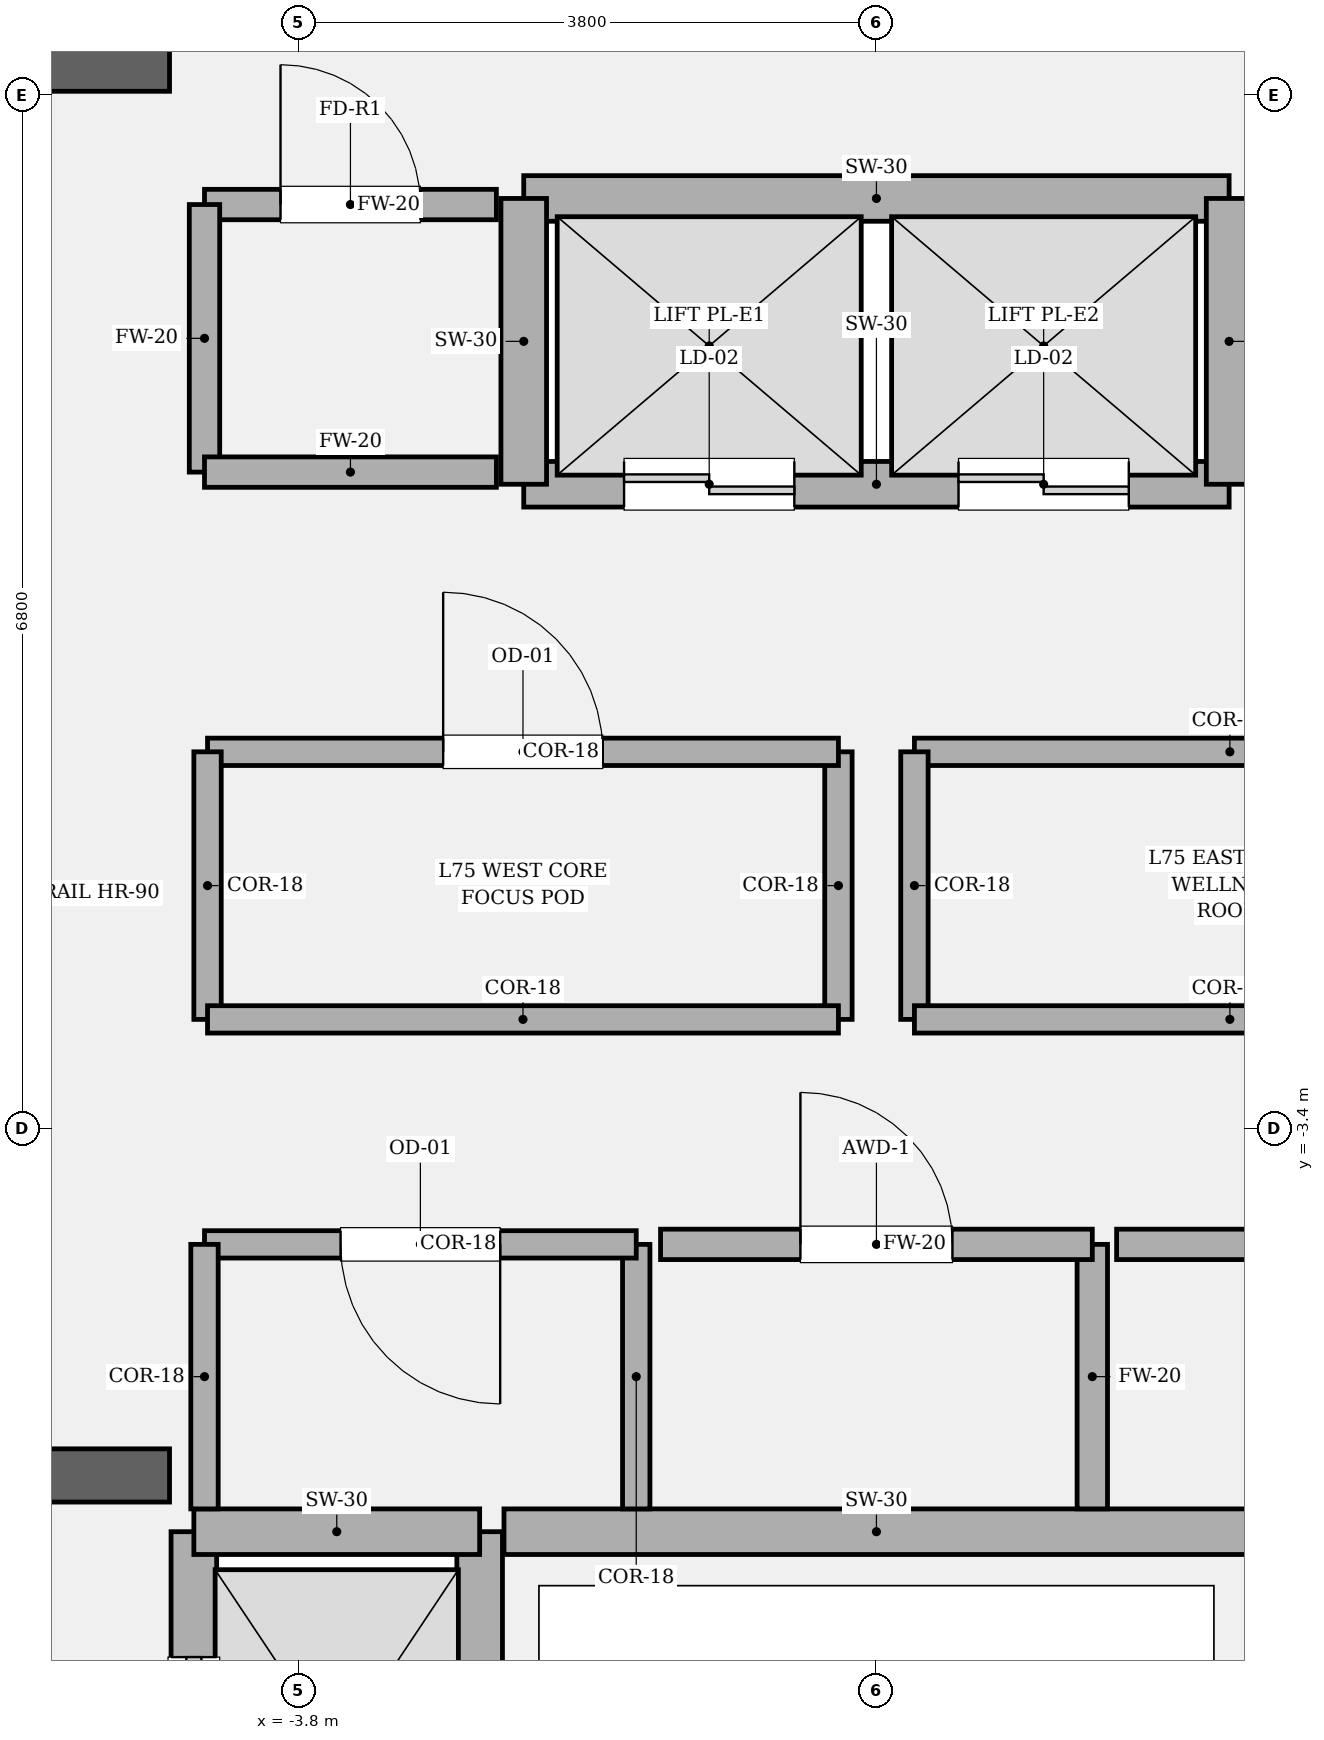
"""IFC4 building model, lengths in metres.
Left out: names, types, materials, properties, quantities, classifications, styles, units other than length and angle.
Written with IfcOpenShell. Run it as: python <this file> out.ifc"""

import sys

from ifc_helpers import new_model, si_unit, direction, frame, frame_2d, origin, place, context, subcontext, project, spatial, rectangle, extrude, element, fill, save


model = new_model("IFC4")
c1 = context("Model", 3, precision=1e-05, world=origin(), true_north=direction((0.0, 1.0)))
c2 = subcontext(c1, "Body", "Model", "MODEL_VIEW")
j1 = project(units=[si_unit("LENGTHUNIT", "METRE"), si_unit("PLANEANGLEUNIT", "RADIAN")], contexts=[c1])
p1 = place(None, origin())
s1 = spatial("IfcSite", under=j1, at=p1, CompositionType="ELEMENT")
p2 = place(p1, origin())
s2 = spatial("IfcBuilding", under=s1, at=p2, CompositionType="ELEMENT")
p3 = place(p2, frame((0.0, 0.0, 317.4)))
s3 = spatial("IfcBuildingStorey", under=s2, at=p3, CompositionType="ELEMENT", Elevation=317.4)
p4 = place(p3, frame((-9.975, -5.68, 0.0), z_axis=(0.0, 0.0, 1.0), x_axis=(1.0, 0.0, 0.0)))
e1 = element("IfcWall", 1, at=p4, inside=s3, PredefinedType="SOLIDWALL", context=c2, shape_type="SweptSolid", body=[
    extrude(rectangle(XDim=5.325, YDim=0.35, at=frame_2d((2.663, 0.0))), origin(), (0.0, 0.0, 1.0), 4.2),
])
p5 = place(p4, frame((1.435, 0.0, 0.0)))
e2 = element("IfcOpeningElement", 2, at=p5, cuts=e1, PredefinedType="OPENING", context=c2, shape_type="SweptSolid", body=[
    extrude(rectangle(XDim=1.18, YDim=2.2, at=frame_2d((0.59, 1.1))), frame((0.0, 0.185, 0.0), z_axis=(0.0, -1.0, 0.0), x_axis=(1.0, 0.0, 0.0)), (0.0, 0.0, 1.0), 0.37),
])
p6 = place(p3, frame((-9.975, 3.6, 0.0), z_axis=(0.0, 0.0, 1.0), x_axis=(1.0, 0.0, 0.0)))
e3 = element("IfcWall", 3, at=p6, inside=s3, PredefinedType="SOLIDWALL", context=c2, shape_type="SweptSolid", body=[
    extrude(rectangle(XDim=5.325, YDim=0.35, at=frame_2d((2.663, 0.0))), origin(), (0.0, 0.0, 1.0), 4.2),
])
p7 = place(p3, frame((-4.49, -8.82, 0.0), z_axis=(0.0, 0.0, 1.0), x_axis=(0.0, 1.0, 0.0)))
e4 = element("IfcWall", 4, at=p7, inside=s3, PredefinedType="SOLIDWALL", context=c2, shape_type="SweptSolid", body=[
    extrude(rectangle(XDim=2.77, YDim=0.3, at=frame_2d((1.385, 0.0))), origin(), (0.0, 0.0, 1.0), 4.0),
])
p8 = place(p7, frame((0.825, 0.0, 0.0)))
e5 = element("IfcOpeningElement", 5, at=p8, cuts=e4, PredefinedType="OPENING", context=c2, shape_type="SweptSolid", body=[
    extrude(rectangle(XDim=1.12, YDim=2.25, at=frame_2d((0.56, 1.125))), frame((0.0, 0.16, 0.0), z_axis=(0.0, -1.0, 0.0), x_axis=(1.0, 0.0, 0.0)), (0.0, 0.0, 1.0), 0.32),
])
p9 = place(p3, frame((-2.61, -8.82, 0.0), z_axis=(0.0, 0.0, 1.0), x_axis=(0.0, 1.0, 0.0)))
e6 = element("IfcWall", 6, at=p9, inside=s3, PredefinedType="SOLIDWALL", context=c2, shape_type="SweptSolid", body=[
    extrude(rectangle(XDim=2.77, YDim=0.3, at=frame_2d((1.385, 0.0))), origin(), (0.0, 0.0, 1.0), 4.0),
])
p10 = place(p3, frame((-4.49, -6.05, 0.0), z_axis=(0.0, 0.0, 1.0), x_axis=(1.0, 0.0, 0.0)))
e7 = element("IfcWall", 7, at=p10, inside=s3, PredefinedType="SOLIDWALL", context=c2, shape_type="SweptSolid", body=[
    extrude(rectangle(XDim=1.88, YDim=0.3, at=frame_2d((0.94, 0.0))), origin(), (0.0, 0.0, 1.0), 4.0),
])
p11 = place(p3, frame((-2.32, 0.84, 0.0), z_axis=(0.0, 0.0, 1.0), x_axis=(1.0, 0.0, 0.0)))
e8 = element("IfcWall", 8, at=p11, inside=s3, PredefinedType="SOLIDWALL", context=c2, shape_type="SweptSolid", body=[
    extrude(rectangle(XDim=4.64, YDim=0.3, at=frame_2d((2.32, 0.0))), origin(), (0.0, 0.0, 1.0), 4.0),
])
p12 = place(p11, frame((0.66, 0.0, 0.0)))
e9 = element("IfcOpeningElement", 9, at=p12, cuts=e8, PredefinedType="OPENING", context=c2, shape_type="SweptSolid", body=[
    extrude(rectangle(XDim=1.12, YDim=2.25, at=frame_2d((0.56, 1.125))), frame((0.0, 0.16, 0.0), z_axis=(0.0, -1.0, 0.0), x_axis=(1.0, 0.0, 0.0)), (0.0, 0.0, 1.0), 0.32),
])
p13 = place(p11, frame((2.86, 0.0, 0.0)))
e10 = element("IfcOpeningElement", 10, at=p13, cuts=e8, PredefinedType="OPENING", context=c2, shape_type="SweptSolid", body=[
    extrude(rectangle(XDim=1.12, YDim=2.25, at=frame_2d((0.56, 1.125))), frame((0.0, 0.16, 0.0), z_axis=(0.0, -1.0, 0.0), x_axis=(1.0, 0.0, 0.0)), (0.0, 0.0, 1.0), 0.32),
])
p14 = place(p3, frame((-2.32, 2.72, 0.0), z_axis=(0.0, 0.0, 1.0), x_axis=(1.0, 0.0, 0.0)))
e11 = element("IfcWall", 11, at=p14, inside=s3, PredefinedType="SOLIDWALL", context=c2, shape_type="SweptSolid", body=[
    extrude(rectangle(XDim=4.64, YDim=0.3, at=frame_2d((2.32, 0.0))), origin(), (0.0, 0.0, 1.0), 4.0),
])
for number, where, z_axis, x_axis in (
    (12, (-2.32, 0.84, 0.0), (0.0, 0.0, 1.0), (0.0, 1.0, 0.0)),
    (13, (2.32, 0.84, 0.0), (0.0, 0.0, 1.0), (0.0, 1.0, 0.0)),
):
    element("IfcWall", number, at=place(p3, frame(where, z_axis=z_axis, x_axis=x_axis)), inside=s3, PredefinedType="SOLIDWALL", context=c2, shape_type="SweptSolid", body=[
        extrude(rectangle(XDim=1.88, YDim=0.3, at=frame_2d((0.94, 0.0))), origin(), (0.0, 0.0, 1.0), 4.0),
    ])
p15 = place(p3, frame((-2.45, -6.05, 0.0), z_axis=(0.0, 0.0, 1.0), x_axis=(1.0, 0.0, 0.0)))
e14 = element("IfcWall", 14, at=p15, inside=s3, PredefinedType="SOLIDWALL", context=c2, shape_type="SweptSolid", body=[
    extrude(rectangle(XDim=4.9, YDim=0.3, at=frame_2d((2.45, 0.0))), origin(), (0.0, 0.0, 1.0), 4.0),
])
p16 = place(p3, frame((-1.58, -5.9, 0.0), z_axis=(0.0, 0.0, 1.0), x_axis=(0.0, 1.0, 0.0)))
e15 = element("IfcWall", 15, at=p16, inside=s3, PredefinedType="PARTITIONING", context=c2, shape_type="SweptSolid", body=[
    extrude(rectangle(XDim=1.74, YDim=0.18, at=frame_2d((0.87, 0.0))), origin(), (0.0, 0.0, 1.0), 4.0),
])
p17 = place(p3, frame((-1.58, -4.16, 0.0), z_axis=(0.0, 0.0, 1.0), x_axis=(-1.0, 0.0, 0.0)))
e16 = element("IfcWall", 16, at=p17, inside=s3, PredefinedType="PARTITIONING", context=c2, shape_type="SweptSolid", body=[
    extrude(rectangle(XDim=2.84, YDim=0.18, at=frame_2d((1.42, 0.0))), origin(), (0.0, 0.0, 1.0), 4.0),
])
p18 = place(p17, frame((0.895, 0.0, 0.0)))
e17 = element("IfcOpeningElement", 17, at=p18, cuts=e16, PredefinedType="OPENING", context=c2, shape_type="SweptSolid", body=[
    extrude(rectangle(XDim=1.05, YDim=2.2, at=frame_2d((0.525, 1.1))), frame((0.0, 0.1, 0.0), z_axis=(0.0, -1.0, 0.0), x_axis=(1.0, 0.0, 0.0)), (0.0, 0.0, 1.0), 0.2),
])
p19 = place(p3, frame((-4.42, -4.16, 0.0), z_axis=(0.0, 0.0, 1.0), x_axis=(0.0, -1.0, 0.0)))
e18 = element("IfcWall", 18, at=p19, inside=s3, PredefinedType="PARTITIONING", context=c2, shape_type="SweptSolid", body=[
    extrude(rectangle(XDim=1.74, YDim=0.18, at=frame_2d((0.87, 0.0))), origin(), (0.0, 0.0, 1.0), 4.0),
])
p20 = place(p3, frame((1.42, -5.9, 0.0), z_axis=(0.0, 0.0, 1.0), x_axis=(0.0, 1.0, 0.0)))
e19 = element("IfcWall", 19, at=p20, inside=s3, PredefinedType="SOLIDWALL", context=c2, shape_type="SweptSolid", body=[
    extrude(rectangle(XDim=1.74, YDim=0.2, at=frame_2d((0.87, 0.0))), origin(), (0.0, 0.0, 1.0), 4.0),
])
p21 = place(p3, frame((1.42, -4.16, 0.0), z_axis=(0.0, 0.0, 1.0), x_axis=(-1.0, 0.0, 0.0)))
e20 = element("IfcWall", 20, at=p21, inside=s3, PredefinedType="SOLIDWALL", context=c2, shape_type="SweptSolid", body=[
    extrude(rectangle(XDim=2.84, YDim=0.2, at=frame_2d((1.42, 0.0))), origin(), (0.0, 0.0, 1.0), 4.0),
])
p22 = place(p21, frame((0.92, 0.0, 0.0)))
e21 = element("IfcOpeningElement", 21, at=p22, cuts=e20, PredefinedType="OPENING", context=c2, shape_type="SweptSolid", body=[
    extrude(rectangle(XDim=1.0, YDim=2.15, at=frame_2d((0.5, 1.075))), frame((0.0, 0.11, 0.0), z_axis=(0.0, -1.0, 0.0), x_axis=(1.0, 0.0, 0.0)), (0.0, 0.0, 1.0), 0.22),
])
p23 = place(p3, frame((4.42, -4.16, 0.0), z_axis=(0.0, 0.0, 1.0), x_axis=(-1.0, 0.0, 0.0)))
e22 = element("IfcWall", 22, at=p23, inside=s3, PredefinedType="SOLIDWALL", context=c2, shape_type="SweptSolid", body=[
    extrude(rectangle(XDim=2.84, YDim=0.2, at=frame_2d((1.42, 0.0))), origin(), (0.0, 0.0, 1.0), 4.0),
])
p24 = place(p23, frame((0.945, 0.0, 0.0)))
e23 = element("IfcOpeningElement", 23, at=p24, cuts=e22, PredefinedType="OPENING", context=c2, shape_type="SweptSolid", body=[
    extrude(rectangle(XDim=0.95, YDim=2.15, at=frame_2d((0.475, 1.075))), frame((0.0, 0.11, 0.0), z_axis=(0.0, -1.0, 0.0), x_axis=(1.0, 0.0, 0.0)), (0.0, 0.0, 1.0), 0.22),
])
p25 = place(p3, frame((-0.25, -2.68, 0.0), z_axis=(0.0, 0.0, 1.0), x_axis=(0.0, 1.0, 0.0)))
e24 = element("IfcWall", 24, at=p25, inside=s3, PredefinedType="PARTITIONING", context=c2, shape_type="SweptSolid", body=[
    extrude(rectangle(XDim=1.76, YDim=0.18, at=frame_2d((0.88, 0.0))), origin(), (0.0, 0.0, 1.0), 4.0),
])
p26 = place(p3, frame((-0.25, -0.92, 0.0), z_axis=(0.0, 0.0, 1.0), x_axis=(-1.0, 0.0, 0.0)))
e25 = element("IfcWall", 25, at=p26, inside=s3, PredefinedType="PARTITIONING", context=c2, shape_type="SweptSolid", body=[
    extrude(rectangle(XDim=4.15, YDim=0.18, at=frame_2d((2.075, 0.0))), origin(), (0.0, 0.0, 1.0), 4.0),
])
p27 = place(p26, frame((1.55, 0.0, 0.0)))
e26 = element("IfcOpeningElement", 26, at=p27, cuts=e25, PredefinedType="OPENING", context=c2, shape_type="SweptSolid", body=[
    extrude(rectangle(XDim=1.05, YDim=2.2, at=frame_2d((0.525, 1.1))), frame((0.0, 0.1, 0.0), z_axis=(0.0, -1.0, 0.0), x_axis=(1.0, 0.0, 0.0)), (0.0, 0.0, 1.0), 0.2),
])
p28 = place(p3, frame((-4.4, -0.92, 0.0), z_axis=(0.0, 0.0, 1.0), x_axis=(0.0, -1.0, 0.0)))
e27 = element("IfcWall", 27, at=p28, inside=s3, PredefinedType="PARTITIONING", context=c2, shape_type="SweptSolid", body=[
    extrude(rectangle(XDim=1.76, YDim=0.18, at=frame_2d((0.88, 0.0))), origin(), (0.0, 0.0, 1.0), 4.0),
])
for number, where, z_axis, x_axis in (
    (28, (-4.4, -2.68, 0.0), (0.0, 0.0, 1.0), (1.0, 0.0, 0.0)),
    (29, (4.4, -0.92, 0.0), (0.0, 0.0, 1.0), (-1.0, 0.0, 0.0)),
):
    element("IfcWall", number, at=place(p3, frame(where, z_axis=z_axis, x_axis=x_axis)), inside=s3, PredefinedType="PARTITIONING", context=c2, shape_type="SweptSolid", body=[
        extrude(rectangle(XDim=4.15, YDim=0.18, at=frame_2d((2.075, 0.0))), origin(), (0.0, 0.0, 1.0), 4.0),
    ])
p29 = place(p3, frame((0.25, -0.92, 0.0), z_axis=(0.0, 0.0, 1.0), x_axis=(0.0, -1.0, 0.0)))
e30 = element("IfcWall", 30, at=p29, inside=s3, PredefinedType="PARTITIONING", context=c2, shape_type="SweptSolid", body=[
    extrude(rectangle(XDim=1.76, YDim=0.18, at=frame_2d((0.88, 0.0))), origin(), (0.0, 0.0, 1.0), 4.0),
])
p30 = place(p3, frame((0.25, -2.68, 0.0), z_axis=(0.0, 0.0, 1.0), x_axis=(1.0, 0.0, 0.0)))
e31 = element("IfcWall", 31, at=p30, inside=s3, PredefinedType="PARTITIONING", context=c2, shape_type="SweptSolid", body=[
    extrude(rectangle(XDim=4.15, YDim=0.18, at=frame_2d((2.075, 0.0))), origin(), (0.0, 0.0, 1.0), 4.0),
])
p31 = place(p3, frame((-2.5, 2.68, 0.0), z_axis=(0.0, 0.0, 1.0), x_axis=(-1.0, 0.0, 0.0)))
e32 = element("IfcWall", 32, at=p31, inside=s3, PredefinedType="SOLIDWALL", context=c2, shape_type="SweptSolid", body=[
    extrude(rectangle(XDim=1.92, YDim=0.2, at=frame_2d((0.96, 0.0))), origin(), (0.0, 0.0, 1.0), 4.0),
])
p32 = place(p31, frame((0.5, 0.0, 0.0)))
e33 = element("IfcOpeningElement", 33, at=p32, cuts=e32, PredefinedType="OPENING", context=c2, shape_type="SweptSolid", body=[
    extrude(rectangle(XDim=0.92, YDim=2.1, at=frame_2d((0.46, 1.05))), frame((0.0, 0.11, 0.0), z_axis=(0.0, -1.0, 0.0), x_axis=(1.0, 0.0, 0.0)), (0.0, 0.0, 1.0), 0.22),
])
p33 = place(p3, frame((-4.42, 2.68, 0.0), z_axis=(0.0, 0.0, 1.0), x_axis=(0.0, -1.0, 0.0)))
e34 = element("IfcWall", 34, at=p33, inside=s3, PredefinedType="SOLIDWALL", context=c2, shape_type="SweptSolid", body=[
    extrude(rectangle(XDim=1.76, YDim=0.2, at=frame_2d((0.88, 0.0))), origin(), (0.0, 0.0, 1.0), 4.0),
])
p34 = place(p3, frame((-4.42, 0.92, 0.0), z_axis=(0.0, 0.0, 1.0), x_axis=(1.0, 0.0, 0.0)))
e35 = element("IfcWall", 35, at=p34, inside=s3, PredefinedType="SOLIDWALL", context=c2, shape_type="SweptSolid", body=[
    extrude(rectangle(XDim=1.92, YDim=0.2, at=frame_2d((0.96, 0.0))), origin(), (0.0, 0.0, 1.0), 4.0),
])
p35 = place(p8, origin())
e36 = element("IfcDoor", 36, at=p35, inside=s3, OperationType="SLIDING_TO_LEFT", PredefinedType="DOOR", context=c2, shape_type="SweptSolid", body=[
    extrude(rectangle(XDim=1.12, YDim=2.25, at=frame_2d((0.56, 1.125))), frame((0.0, 0.025, 0.0), z_axis=(0.0, -1.0, 0.0), x_axis=(1.0, 0.0, 0.0)), (0.0, 0.0, 1.0), 0.05),
])
fill(e5, e36)
p36 = place(p12, origin())
e37 = element("IfcDoor", 37, at=p36, inside=s3, OperationType="DOUBLE_DOOR_SLIDING", PredefinedType="DOOR", context=c2, shape_type="SweptSolid", body=[
    extrude(rectangle(XDim=1.12, YDim=2.25, at=frame_2d((0.56, 1.125))), frame((0.0, 0.025, 0.0), z_axis=(0.0, -1.0, 0.0), x_axis=(1.0, 0.0, 0.0)), (0.0, 0.0, 1.0), 0.05),
])
fill(e9, e37)
p37 = place(p13, origin())
e38 = element("IfcDoor", 38, at=p37, inside=s3, OperationType="DOUBLE_DOOR_SLIDING", PredefinedType="DOOR", context=c2, shape_type="SweptSolid", body=[
    extrude(rectangle(XDim=1.12, YDim=2.25, at=frame_2d((0.56, 1.125))), frame((0.0, 0.025, 0.0), z_axis=(0.0, -1.0, 0.0), x_axis=(1.0, 0.0, 0.0)), (0.0, 0.0, 1.0), 0.05),
])
fill(e10, e38)
p38 = place(p18, origin())
e39 = element("IfcDoor", 39, at=p38, inside=s3, OperationType="SINGLE_SWING_LEFT", PredefinedType="DOOR", context=c2, shape_type="SweptSolid", body=[
    extrude(rectangle(XDim=1.05, YDim=2.2, at=frame_2d((0.525, 1.1))), frame((0.0, 0.025, 0.0), z_axis=(0.0, -1.0, 0.0), x_axis=(1.0, 0.0, 0.0)), (0.0, 0.0, 1.0), 0.05),
])
fill(e17, e39)
p39 = place(p22, origin())
e40 = element("IfcDoor", 40, at=p39, inside=s3, OperationType="SINGLE_SWING_RIGHT", PredefinedType="DOOR", context=c2, shape_type="SweptSolid", body=[
    extrude(rectangle(XDim=1.0, YDim=2.15, at=frame_2d((0.5, 1.075))), frame((0.0, 0.025, 0.0), z_axis=(0.0, -1.0, 0.0), x_axis=(1.0, 0.0, 0.0)), (0.0, 0.0, 1.0), 0.05),
])
fill(e21, e40)
p40 = place(p27, origin())
e41 = element("IfcDoor", 41, at=p40, inside=s3, OperationType="SINGLE_SWING_RIGHT", PredefinedType="DOOR", context=c2, shape_type="SweptSolid", body=[
    extrude(rectangle(XDim=1.05, YDim=2.2, at=frame_2d((0.525, 1.1))), frame((0.0, 0.025, 0.0), z_axis=(0.0, -1.0, 0.0), x_axis=(1.0, 0.0, 0.0)), (0.0, 0.0, 1.0), 0.05),
])
fill(e26, e41)
p41 = place(p32, origin())
e42 = element("IfcDoor", 42, at=p41, inside=s3, OperationType="SINGLE_SWING_RIGHT", PredefinedType="DOOR", context=c2, shape_type="SweptSolid", body=[
    extrude(rectangle(XDim=0.92, YDim=2.1, at=frame_2d((0.46, 1.05))), frame((0.0, 0.025, 0.0), z_axis=(0.0, -1.0, 0.0), x_axis=(1.0, 0.0, 0.0)), (0.0, 0.0, 1.0), 0.05),
])
fill(e33, e42)
save(model, sys.argv[1])
